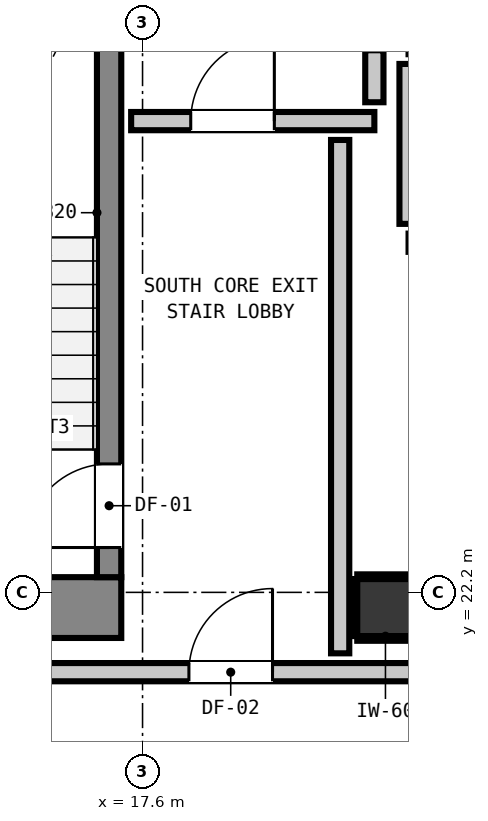
"""IFC4 building model, lengths in metres.
Left out: names, types, materials, properties, quantities, classifications, styles, units other than length and angle.
Written with IfcOpenShell. Run it as: python <this file> out.ifc"""

import sys

from ifc_helpers import new_model, si_unit, direction, frame, frame_2d, origin, origin_2d, place, context, subcontext, project, spatial, rectangle, extrude, element, fill, save


model = new_model("IFC4")
c1 = context("Model", 3, precision=1e-05, world=origin(), true_north=direction((0.0, 1.0)))
c2 = subcontext(c1, "Body", "Model", "MODEL_VIEW")
j1 = project(units=[si_unit("LENGTHUNIT", "METRE"), si_unit("PLANEANGLEUNIT", "RADIAN")], contexts=[c1])
p1 = place(None, origin())
s1 = spatial("IfcSite", under=j1, at=p1, CompositionType="ELEMENT")
p2 = place(p1, origin())
s2 = spatial("IfcBuilding", under=s1, at=p2, CompositionType="ELEMENT")
p3 = place(p2, frame((0.0, 0.0, 176.88)))
s3 = spatial("IfcBuildingStorey", under=s2, at=p3, CompositionType="ELEMENT", Elevation=176.88)
p4 = place(p3, frame((20.8, 22.0, 0.0), z_axis=(0.0, 0.0, 1.0), x_axis=(1.0, 0.0, 0.0)))
e1 = element("IfcColumn", 1, at=p4, inside=s3, PredefinedType="COLUMN", context=c2, shape_type="SweptSolid", body=[
    extrude(rectangle(XDim=0.75, YDim=0.75, at=origin_2d()), origin(), (0.0, 0.0, 1.0), 3.32),
])
p5 = place(p3, frame((13.24, 22.0, 0.0), z_axis=(0.0, 0.0, 1.0), x_axis=(1.0, 0.0, 0.0)))
e2 = element("IfcWall", 2, at=p5, inside=s3, PredefinedType="SHEAR", context=c2, shape_type="SweptSolid", body=[
    extrude(rectangle(XDim=4.08, YDim=0.8, at=frame_2d((2.04, 0.0))), origin(), (0.0, 0.0, 1.0), 3.32),
])
p6 = place(p3, frame((17.16, 22.4, 0.0), z_axis=(0.0, 0.0, 1.0), x_axis=(0.0, 1.0, 0.0)))
e3 = element("IfcWall", 3, at=p6, inside=s3, PredefinedType="SHEAR", context=c2, shape_type="SweptSolid", body=[
    extrude(rectangle(XDim=8.0, YDim=0.32, at=frame_2d((4.0, 0.0))), origin(), (0.0, 0.0, 1.0), 3.32),
])
p7 = place(p6, frame((0.39, 0.0, 0.0)))
e4 = element("IfcOpeningElement", 4, at=p7, cuts=e3, PredefinedType="OPENING", context=c2, shape_type="SweptSolid", body=[
    extrude(rectangle(XDim=1.1, YDim=2.15, at=frame_2d((0.55, 1.075))), frame((0.0, 0.17, 0.0), z_axis=(0.0, -1.0, 0.0), x_axis=(1.0, 0.0, 0.0)), (0.0, 0.0, 1.0), 0.34),
])
for number, where, z_axis, x_axis in (
    (5, (21.1, 26.8, 0.0), (0.0, 0.0, 1.0), (1.0, 0.0, 0.0)),
    (6, (21.1, 29.4, 0.0), (0.0, 0.0, 1.0), (1.0, 0.0, 0.0)),
):
    element("IfcWall", number, at=place(p3, frame(where, z_axis=z_axis, x_axis=x_axis)), inside=s3, PredefinedType="PARTITIONING", context=c2, shape_type="SweptSolid", body=[
        extrude(rectangle(XDim=2.2, YDim=0.24, at=frame_2d((1.1, 0.0))), origin(), (0.0, 0.0, 1.0), 3.08),
    ])
p8 = place(p3, frame((21.1, 27.048, 0.0), z_axis=(0.0, 0.0, 1.0), x_axis=(0.0, 1.0, 0.0)))
e7 = element("IfcWall", 7, at=p8, inside=s3, PredefinedType="PARTITIONING", context=c2, shape_type="SweptSolid", body=[
    extrude(rectangle(XDim=2.104, YDim=0.24, at=frame_2d((1.052, 0.0))), origin(), (0.0, 0.0, 1.0), 2.315),
])
p9 = place(p3, frame((12.983, 21.15, 0.0), z_axis=(0.0, 0.0, 1.0), x_axis=(1.0, 0.0, 0.0)))
e8 = element("IfcWall", 8, at=p9, inside=s3, PredefinedType="PARTITIONING", context=c2, shape_type="SweptSolid", body=[
    extrude(rectangle(XDim=29.61, YDim=0.24, at=frame_2d((14.805, 0.0))), origin(), (0.0, 0.0, 1.0), 3.08),
])
p10 = place(p9, frame((5.227, 0.0, 0.0)))
e9 = element("IfcOpeningElement", 9, at=p10, cuts=e8, PredefinedType="OPENING", context=c2, shape_type="SweptSolid", body=[
    extrude(rectangle(XDim=1.1, YDim=2.15, at=frame_2d((0.55, 1.075))), frame((0.0, 0.13, 0.0), z_axis=(0.0, -1.0, 0.0), x_axis=(1.0, 0.0, 0.0)), (0.0, 0.0, 1.0), 0.26),
])
p11 = place(p9, frame((27.638, 0.0, 0.0)))
e10 = element("IfcOpeningElement", 10, at=p11, cuts=e8, PredefinedType="OPENING", context=c2, shape_type="SweptSolid", body=[
    extrude(rectangle(XDim=0.9, YDim=2.1, at=frame_2d((0.45, 1.05))), frame((0.0, 0.13, 0.0), z_axis=(0.0, -1.0, 0.0), x_axis=(1.0, 0.0, 0.0)), (0.0, 0.0, 1.0), 0.26),
])
p12 = place(p3, frame((17.45, 28.4, 0.0), z_axis=(0.0, 0.0, 1.0), x_axis=(1.0, 0.0, 0.0)))
e11 = element("IfcWall", 11, at=p12, inside=s3, PredefinedType="PARTITIONING", context=c2, shape_type="SweptSolid", body=[
    extrude(rectangle(XDim=3.2, YDim=0.24, at=frame_2d((1.6, 0.0))), origin(), (0.0, 0.0, 1.0), 3.08),
])
p13 = place(p12, frame((0.784, 0.0, 0.0)))
e12 = element("IfcOpeningElement", 12, at=p13, cuts=e11, PredefinedType="OPENING", context=c2, shape_type="SweptSolid", body=[
    extrude(rectangle(XDim=1.1, YDim=2.15, at=frame_2d((0.55, 1.075))), frame((0.0, 0.13, 0.0), z_axis=(0.0, -1.0, 0.0), x_axis=(1.0, 0.0, 0.0)), (0.0, 0.0, 1.0), 0.26),
])
p14 = place(p3, frame((20.2, 21.398, 0.0), z_axis=(0.0, 0.0, 1.0), x_axis=(0.0, 1.0, 0.0)))
e13 = element("IfcWall", 13, at=p14, inside=s3, PredefinedType="PARTITIONING", context=c2, shape_type="SweptSolid", body=[
    extrude(rectangle(XDim=6.754, YDim=0.24, at=frame_2d((3.377, 0.0))), origin(), (0.0, 0.0, 1.0), 3.08),
])
p15 = place(p3, frame((20.65, 28.648, 0.0), z_axis=(0.0, 0.0, 1.0), x_axis=(0.0, 1.0, 0.0)))
e14 = element("IfcWall", 14, at=p15, inside=s3, PredefinedType="PARTITIONING", context=c2, shape_type="SweptSolid", body=[
    extrude(rectangle(XDim=0.684, YDim=0.24, at=frame_2d((0.342, 0.0))), origin(), (0.0, 0.0, 1.0), 2.315),
])
for number, where, z_axis, x_axis in (
    (15, (20.425, 21.593, 0.0), (0.0, 0.0, 1.0), (1.0, 0.0, 0.0)),
    (16, (20.425, 22.407, 0.0), (0.0, 0.0, 1.0), (1.0, 0.0, 0.0)),
):
    element("IfcWall", number, at=place(p3, frame(where, z_axis=z_axis, x_axis=x_axis)), inside=s3, PredefinedType="PARTITIONING", context=c2, shape_type="SweptSolid", body=[
        extrude(rectangle(XDim=0.742, YDim=0.06, at=frame_2d((0.371, 0.0))), origin(), (0.0, 0.0, 1.0), 1.45),
    ])
p16 = place(p3, frame((20.393, 21.625, 0.0), z_axis=(0.0, 0.0, 1.0), x_axis=(0.0, 1.0, 0.0)))
e17 = element("IfcWall", 17, at=p16, inside=s3, PredefinedType="PARTITIONING", context=c2, shape_type="SweptSolid", body=[
    extrude(rectangle(XDim=0.75, YDim=0.06, at=frame_2d((0.375, 0.0))), origin(), (0.0, 0.0, 1.0), 1.45),
])
p17 = place(p7, origin())
e18 = element("IfcDoor", 18, at=p17, inside=s3, OperationType="SINGLE_SWING_LEFT", PredefinedType="DOOR", context=c2, shape_type="SweptSolid", body=[
    extrude(rectangle(XDim=1.1, YDim=2.15, at=frame_2d((0.55, 1.075))), frame((0.0, 0.025, 0.0), z_axis=(0.0, -1.0, 0.0), x_axis=(1.0, 0.0, 0.0)), (0.0, 0.0, 1.0), 0.05),
])
fill(e4, e18)
p18 = place(p13, origin())
e19 = element("IfcDoor", 19, at=p18, inside=s3, OperationType="SINGLE_SWING_RIGHT", PredefinedType="DOOR", context=c2, shape_type="SweptSolid", body=[
    extrude(rectangle(XDim=1.1, YDim=2.15, at=frame_2d((0.55, 1.075))), frame((0.0, 0.025, 0.0), z_axis=(0.0, -1.0, 0.0), x_axis=(1.0, 0.0, 0.0)), (0.0, 0.0, 1.0), 0.05),
])
fill(e12, e19)
p19 = place(p10, origin())
e20 = element("IfcDoor", 20, at=p19, inside=s3, OperationType="SINGLE_SWING_RIGHT", PredefinedType="DOOR", context=c2, shape_type="SweptSolid", body=[
    extrude(rectangle(XDim=1.1, YDim=2.15, at=frame_2d((0.55, 1.075))), frame((0.0, 0.025, 0.0), z_axis=(0.0, -1.0, 0.0), x_axis=(1.0, 0.0, 0.0)), (0.0, 0.0, 1.0), 0.05),
])
fill(e9, e20)
save(model, sys.argv[1])
